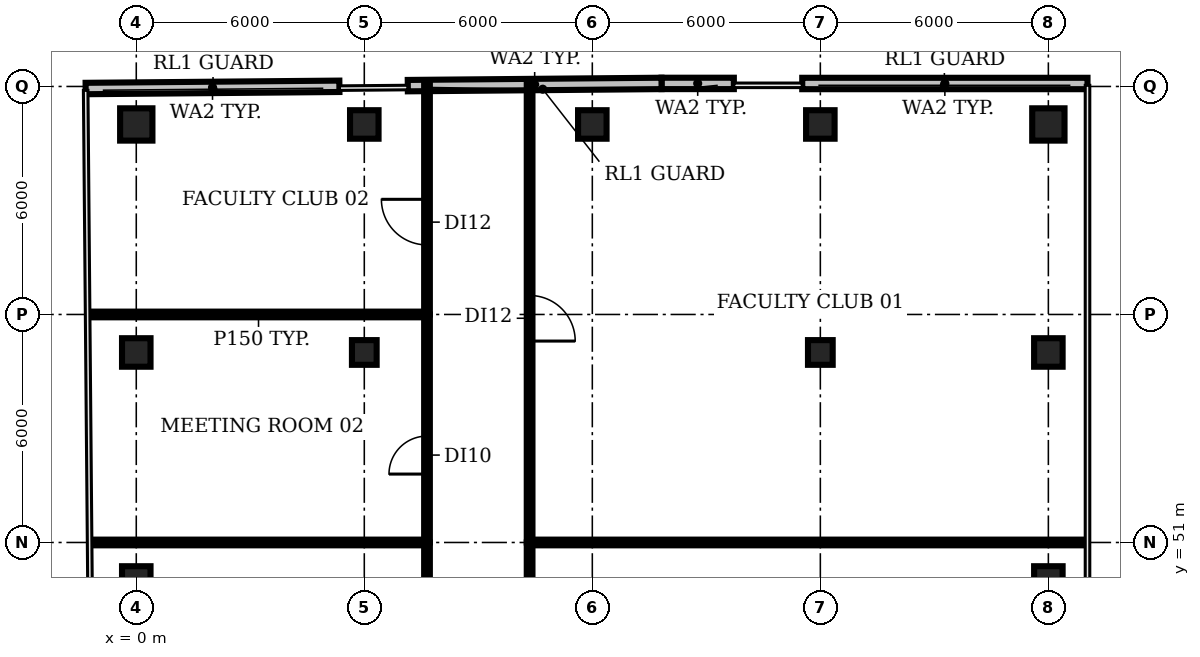
"""IFC4 building model, lengths in metres.
Left out: names, types, materials, properties, quantities, classifications, styles, units other than length and angle.
Written with IfcOpenShell. Run it as: python <this file> out.ifc"""

import sys

from ifc_helpers import new_model, si_unit, direction, frame, frame_2d, origin, origin_2d, place, context, subcontext, project, spatial, rectangle, circle, extrude, element, fill, save


model = new_model("IFC4")
c1 = context("Model", 3, precision=1e-05, world=origin(), true_north=direction((0.0, 1.0)))
c2 = subcontext(c1, "Body", "Model", "MODEL_VIEW")
j1 = project(units=[si_unit("LENGTHUNIT", "METRE"), si_unit("PLANEANGLEUNIT", "RADIAN")], contexts=[c1])
p1 = place(None, origin())
s1 = spatial("IfcSite", under=j1, at=p1, CompositionType="ELEMENT")
p2 = place(p1, origin())
s2 = spatial("IfcBuilding", under=s1, at=p2, CompositionType="ELEMENT")
p3 = place(p2, frame((0.0, 0.0, 289.4)))
s3 = spatial("IfcBuildingStorey", under=s2, at=p3, CompositionType="ELEMENT", Elevation=289.4)
for number, where, z_axis, x_axis in (
    (1, (0.0, 50.0, 0.0), (0.0, 0.0, 1.0), (1.0, 0.0, 0.0)),
    (2, (0.0, 56.0, 0.0), (0.0, 0.0, 1.0), (1.0, 0.0, 0.0)),
):
    element("IfcColumn", number, at=place(p3, frame(where, z_axis=z_axis, x_axis=x_axis)), inside=s3, PredefinedType="COLUMN", context=c2, shape_type="SweptSolid", body=[
        extrude(rectangle(XDim=0.75, YDim=0.75, at=origin_2d()), origin(), (0.0, 0.0, 1.0), 3.85),
    ])
p4 = place(p3, frame((0.0, 62.0, 0.0), z_axis=(0.0, 0.0, 1.0), x_axis=(1.0, 0.0, 0.0)))
e3 = element("IfcColumn", 3, at=p4, inside=s3, PredefinedType="COLUMN", context=c2, shape_type="SweptSolid", body=[
    extrude(circle(Radius=0.425, at=origin_2d()), origin(), (0.0, 0.0, 1.0), 3.85),
])
p5 = place(p3, frame((6.0, 56.0, 0.0), z_axis=(0.0, 0.0, 1.0), x_axis=(1.0, 0.0, 0.0)))
e4 = element("IfcColumn", 4, at=p5, inside=s3, PredefinedType="COLUMN", context=c2, shape_type="SweptSolid", body=[
    extrude(rectangle(XDim=0.65, YDim=0.65, at=origin_2d()), origin(), (0.0, 0.0, 1.0), 3.85),
])
for number, where, z_axis, x_axis in (
    (5, (6.0, 62.0, 0.0), (0.0, 0.0, 1.0), (1.0, 0.0, 0.0)),
    (6, (12.0, 62.0, 0.0), (0.0, 0.0, 1.0), (1.0, 0.0, 0.0)),
):
    element("IfcColumn", number, at=place(p3, frame(where, z_axis=z_axis, x_axis=x_axis)), inside=s3, PredefinedType="COLUMN", context=c2, shape_type="SweptSolid", body=[
        extrude(rectangle(XDim=0.75, YDim=0.75, at=origin_2d()), origin(), (0.0, 0.0, 1.0), 3.85),
    ])
p6 = place(p3, frame((18.0, 56.0, 0.0), z_axis=(0.0, 0.0, 1.0), x_axis=(1.0, 0.0, 0.0)))
e7 = element("IfcColumn", 7, at=p6, inside=s3, PredefinedType="COLUMN", context=c2, shape_type="SweptSolid", body=[
    extrude(rectangle(XDim=0.65, YDim=0.65, at=origin_2d()), origin(), (0.0, 0.0, 1.0), 3.85),
])
for number, where, z_axis, x_axis in (
    (8, (18.0, 62.0, 0.0), (0.0, 0.0, 1.0), (1.0, 0.0, 0.0)),
    (9, (24.0, 50.0, 0.0), (0.0, 0.0, 1.0), (1.0, 0.0, 0.0)),
    (10, (24.0, 56.0, 0.0), (0.0, 0.0, 1.0), (1.0, 0.0, 0.0)),
):
    element("IfcColumn", number, at=place(p3, frame(where, z_axis=z_axis, x_axis=x_axis)), inside=s3, PredefinedType="COLUMN", context=c2, shape_type="SweptSolid", body=[
        extrude(rectangle(XDim=0.75, YDim=0.75, at=origin_2d()), origin(), (0.0, 0.0, 1.0), 3.85),
    ])
p7 = place(p3, frame((24.0, 62.0, 0.0), z_axis=(0.0, 0.0, 1.0), x_axis=(1.0, 0.0, 0.0)))
e11 = element("IfcColumn", 11, at=p7, inside=s3, PredefinedType="COLUMN", context=c2, shape_type="SweptSolid", body=[
    extrude(circle(Radius=0.425, at=origin_2d()), origin(), (0.0, 0.0, 1.0), 3.85),
])
p8 = place(p3, frame((25.03, 63.078, 0.0), z_axis=(0.0, 0.0, 1.0), x_axis=(-1.0, 0.0, 0.0)))
e12 = element("IfcWall", 12, at=p8, inside=s3, PredefinedType="SOLIDWALL", context=c2, shape_type="SweptSolid", body=[
    extrude(rectangle(XDim=7.506, YDim=0.3, at=frame_2d((3.753, 0.0))), origin(), (0.0, 0.0, 1.0), 3.85),
])
p9 = place(p3, frame((15.724, 63.08, 0.0), z_axis=(0.0, 0.0, 1.0), x_axis=(-1.0, 0.0, 0.0)))
e13 = element("IfcWall", 13, at=p9, inside=s3, PredefinedType="SOLIDWALL", context=c2, shape_type="SweptSolid", body=[
    extrude(rectangle(XDim=1.902, YDim=0.3, at=frame_2d((0.951, 0.0))), origin(), (0.0, 0.0, 1.0), 3.85),
])
p10 = place(p3, frame((13.821, 63.08, 0.0), z_axis=(0.0, 0.0, 1.0), x_axis=(-0.999961815264, -0.008738879401, 0.0)))
e14 = element("IfcWall", 14, at=p10, inside=s3, PredefinedType="SOLIDWALL", context=c2, shape_type="SweptSolid", body=[
    extrude(rectangle(XDim=6.677, YDim=0.3, at=frame_2d((3.338, 0.0))), origin(), (0.0, 0.0, 1.0), 3.85),
])
p11 = place(p3, frame((5.345, 63.004, 0.0), z_axis=(0.0, 0.0, 1.0), x_axis=(-0.999961818057, -0.008738559893, 0.0)))
e15 = element("IfcWall", 15, at=p11, inside=s3, PredefinedType="SOLIDWALL", context=c2, shape_type="SweptSolid", body=[
    extrude(rectangle(XDim=6.677, YDim=0.3, at=frame_2d((3.339, 0.0))), origin(), (0.0, 0.0, 1.0), 3.85),
])
p12 = place(p3, frame((-1.216, 57.0, 0.0), z_axis=(0.0, 0.0, 1.0), x_axis=(1.0, 0.0, 0.0)))
e16 = element("IfcWall", 16, at=p12, inside=s3, PredefinedType="PARTITIONING", context=c2, shape_type="SweptSolid", body=[
    extrude(rectangle(XDim=8.866, YDim=0.15, at=frame_2d((4.433, 0.0))), origin(), (0.0, 0.0, 1.0), 2.9),
])
p13 = place(p3, frame((-1.18, 51.0, 0.0), z_axis=(0.0, 0.0, 1.0), x_axis=(1.0, 0.0, 0.0)))
e17 = element("IfcWall", 17, at=p13, inside=s3, PredefinedType="PARTITIONING", context=c2, shape_type="SweptSolid", body=[
    extrude(rectangle(XDim=8.83, YDim=0.15, at=frame_2d((4.415, 0.0))), origin(), (0.0, 0.0, 1.0), 2.9),
])
p14 = place(p3, frame((7.65, 39.0, 0.0), z_axis=(0.0, 0.0, 1.0), x_axis=(0.0, 1.0, 0.0)))
e18 = element("IfcWall", 18, at=p14, inside=s3, PredefinedType="PARTITIONING", context=c2, shape_type="SweptSolid", body=[
    extrude(rectangle(XDim=12.0, YDim=0.15, at=frame_2d((6.0, 0.0))), origin(), (0.0, 0.0, 1.0), 2.9),
])
p15 = place(p14, frame((7.0, 0.0, 0.0)))
e19 = element("IfcOpeningElement", 19, at=p15, cuts=e18, PredefinedType="OPENING", context=c2, shape_type="SweptSolid", body=[
    extrude(rectangle(XDim=1.2, YDim=2.1, at=frame_2d((0.6, 1.05))), frame((0.0, 0.085, 0.0), z_axis=(0.0, -1.0, 0.0), x_axis=(1.0, 0.0, 0.0)), (0.0, 0.0, 1.0), 0.17),
])
p16 = place(p3, frame((7.65, 51.0, 0.0), z_axis=(0.0, 0.0, 1.0), x_axis=(0.0, 1.0, 0.0)))
e20 = element("IfcWall", 20, at=p16, inside=s3, PredefinedType="PARTITIONING", context=c2, shape_type="SweptSolid", body=[
    extrude(rectangle(XDim=6.0, YDim=0.15, at=frame_2d((3.0, 0.0))), origin(), (0.0, 0.0, 1.0), 2.9),
])
p17 = place(p16, frame((1.8, 0.0, 0.0)))
e21 = element("IfcOpeningElement", 21, at=p17, cuts=e20, PredefinedType="OPENING", context=c2, shape_type="SweptSolid", body=[
    extrude(rectangle(XDim=1.0, YDim=2.1, at=frame_2d((0.5, 1.05))), frame((0.0, 0.085, 0.0), z_axis=(0.0, -1.0, 0.0), x_axis=(1.0, 0.0, 0.0)), (0.0, 0.0, 1.0), 0.17),
])
p18 = place(p3, frame((7.65, 57.0, 0.0), z_axis=(0.0, 0.0, 1.0), x_axis=(0.0, 1.0, 0.0)))
e22 = element("IfcWall", 22, at=p18, inside=s3, PredefinedType="PARTITIONING", context=c2, shape_type="SweptSolid", body=[
    extrude(rectangle(XDim=6.036, YDim=0.15, at=frame_2d((3.018, 0.0))), origin(), (0.0, 0.0, 1.0), 2.9),
])
p19 = place(p18, frame((1.83, 0.0, 0.0)))
e23 = element("IfcOpeningElement", 23, at=p19, cuts=e22, PredefinedType="OPENING", context=c2, shape_type="SweptSolid", body=[
    extrude(rectangle(XDim=1.2, YDim=2.1, at=frame_2d((0.6, 1.05))), frame((0.0, 0.085, 0.0), z_axis=(0.0, -1.0, 0.0), x_axis=(1.0, 0.0, 0.0)), (0.0, 0.0, 1.0), 0.17),
])
p20 = place(p3, frame((10.35, 51.0, 0.0), z_axis=(0.0, 0.0, 1.0), x_axis=(0.0, -1.0, 0.0)))
e24 = element("IfcWall", 24, at=p20, inside=s3, PredefinedType="PARTITIONING", context=c2, shape_type="SweptSolid", body=[
    extrude(rectangle(XDim=6.0, YDim=0.15, at=frame_2d((3.0, 0.0))), origin(), (0.0, 0.0, 1.0), 2.9),
])
p21 = place(p20, frame((2.4, 0.0, 0.0)))
e25 = element("IfcOpeningElement", 25, at=p21, cuts=e24, PredefinedType="OPENING", context=c2, shape_type="SweptSolid", body=[
    extrude(rectangle(XDim=1.0, YDim=2.1, at=frame_2d((0.5, 1.05))), frame((0.0, 0.085, 0.0), z_axis=(0.0, -1.0, 0.0), x_axis=(1.0, 0.0, 0.0)), (0.0, 0.0, 1.0), 0.17),
])
p22 = place(p3, frame((10.35, 51.0, 0.0), z_axis=(0.0, 0.0, 1.0), x_axis=(1.0, 0.0, 0.0)))
e26 = element("IfcWall", 26, at=p22, inside=s3, PredefinedType="PARTITIONING", context=c2, shape_type="SweptSolid", body=[
    extrude(rectangle(XDim=14.63, YDim=0.15, at=frame_2d((7.315, 0.0))), origin(), (0.0, 0.0, 1.0), 2.9),
])
p23 = place(p3, frame((10.35, 63.06, 0.0), z_axis=(0.0, 0.0, 1.0), x_axis=(0.0, -1.0, 0.0)))
e27 = element("IfcWall", 27, at=p23, inside=s3, PredefinedType="PARTITIONING", context=c2, shape_type="SweptSolid", body=[
    extrude(rectangle(XDim=12.06, YDim=0.15, at=frame_2d((6.03, 0.0))), origin(), (0.0, 0.0, 1.0), 2.9),
])
p24 = place(p23, frame((5.56, 0.0, 0.0)))
e28 = element("IfcOpeningElement", 28, at=p24, cuts=e27, PredefinedType="OPENING", context=c2, shape_type="SweptSolid", body=[
    extrude(rectangle(XDim=1.2, YDim=2.1, at=frame_2d((0.6, 1.05))), frame((0.0, 0.085, 0.0), z_axis=(0.0, -1.0, 0.0), x_axis=(1.0, 0.0, 0.0)), (0.0, 0.0, 1.0), 0.17),
])
p25 = place(p17, origin())
e29 = element("IfcDoor", 29, at=p25, inside=s3, OperationType="SINGLE_SWING_LEFT", PredefinedType="DOOR", context=c2, shape_type="SweptSolid", body=[
    extrude(rectangle(XDim=1.0, YDim=2.1, at=frame_2d((0.5, 1.05))), frame((0.0, 0.025, 0.0), z_axis=(0.0, -1.0, 0.0), x_axis=(1.0, 0.0, 0.0)), (0.0, 0.0, 1.0), 0.05),
])
fill(e21, e29)
p26 = place(p19, origin())
e30 = element("IfcDoor", 30, at=p26, inside=s3, OperationType="SINGLE_SWING_RIGHT", PredefinedType="DOOR", context=c2, shape_type="SweptSolid", body=[
    extrude(rectangle(XDim=1.2, YDim=2.1, at=frame_2d((0.6, 1.05))), frame((0.0, 0.025, 0.0), z_axis=(0.0, -1.0, 0.0), x_axis=(1.0, 0.0, 0.0)), (0.0, 0.0, 1.0), 0.05),
])
fill(e23, e30)
p27 = place(p24, origin())
e31 = element("IfcDoor", 31, at=p27, inside=s3, OperationType="SINGLE_SWING_RIGHT", PredefinedType="DOOR", context=c2, shape_type="SweptSolid", body=[
    extrude(rectangle(XDim=1.2, YDim=2.1, at=frame_2d((0.6, 1.05))), frame((0.0, 0.025, 0.0), z_axis=(0.0, -1.0, 0.0), x_axis=(1.0, 0.0, 0.0)), (0.0, 0.0, 1.0), 0.05),
])
fill(e28, e31)
save(model, sys.argv[1])
